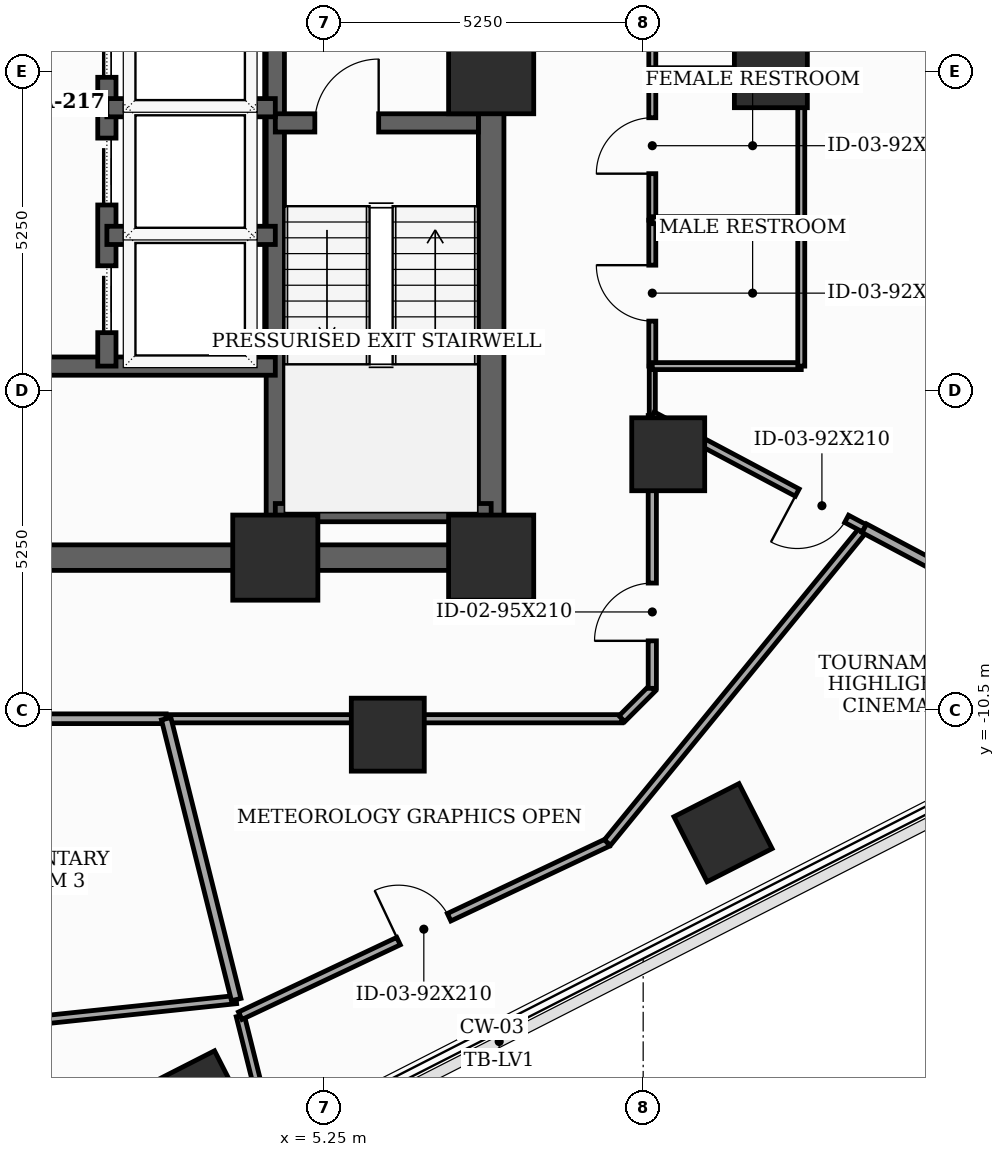
"""IFC4 building model, lengths in metres.
Left out: names, types, materials, properties, quantities, classifications, styles, units other than length and angle.
Written with IfcOpenShell. Run it as: python <this file> out.ifc"""

import sys

from ifc_helpers import new_model, si_unit, direction, frame, frame_2d, origin, origin_2d, place, context, subcontext, project, spatial, rectangle, extrude, element, fill, save


model = new_model("IFC4")
c1 = context("Model", 3, precision=1e-05, world=origin(), true_north=direction((0.0, 1.0)))
c2 = subcontext(c1, "Body", "Model", "MODEL_VIEW")
j1 = project(units=[si_unit("LENGTHUNIT", "METRE"), si_unit("PLANEANGLEUNIT", "RADIAN")], contexts=[c1])
p1 = place(None, origin())
s1 = spatial("IfcSite", under=j1, at=p1, CompositionType="ELEMENT")
p2 = place(p1, origin())
s2 = spatial("IfcBuilding", under=s1, at=p2, CompositionType="ELEMENT")
p3 = place(p2, frame((0.0, 0.0, 123.6)))
s3 = spatial("IfcBuildingStorey", under=s2, at=p3, CompositionType="ELEMENT", Elevation=123.6)
for number, where, z_axis, x_axis in (
    (1, (4.45, -8.0, 0.0), (0.0, 0.0, 1.0), (1.0, 0.0, 0.0)),
    (2, (8.0, -8.0, 0.0), (0.0, 0.0, 1.0), (1.0, 0.0, 0.0)),
    (3, (8.0, 0.0, 0.0), (0.0, 0.0, 1.0), (1.0, 0.0, 0.0)),
):
    element("IfcColumn", number, at=place(p3, frame(where, z_axis=z_axis, x_axis=x_axis)), inside=s3, PredefinedType="COLUMN", context=c2, shape_type="SweptSolid", body=[
        extrude(rectangle(XDim=1.4, YDim=1.4, at=origin_2d()), origin(), (0.0, 0.0, 1.0), 3.7),
    ])
for number, where, z_axis, x_axis in (
    (4, (12.6, 0.0, 0.0), (0.0, 0.0, 1.0), (1.0, 0.0, 0.0)),
    (5, (6.3, -10.912, 0.0), (0.0, 0.0, 1.0), (1.0, 0.0, 0.0)),
    (6, (10.912, -6.3, 0.0), (0.0, 0.0, 1.0), (1.0, 0.0, 0.0)),
    (7, (3.188, -16.918, 0.0), (0.0, 0.0, 1.0), (0.891, 0.454, 0.0)),
    (8, (11.813, -12.524, 0.0), (0.0, 0.0, 1.0), (0.891, 0.454, 0.0)),
):
    element("IfcColumn", number, at=place(p3, frame(where, z_axis=z_axis, x_axis=x_axis)), inside=s3, PredefinedType="COLUMN", context=c2, shape_type="SweptSolid", body=[
        extrude(rectangle(XDim=1.2, YDim=1.2, at=origin_2d()), origin(), (0.0, 0.0, 1.0), 3.7),
    ])
p4 = place(p3, frame((8.0, -8.0, 0.0), z_axis=(0.0, 0.0, 1.0), x_axis=(0.0, 1.0, 0.0)))
e9 = element("IfcWall", 9, at=p4, inside=s3, PredefinedType="SHEAR", context=c2, shape_type="SweptSolid", body=[
    extrude(rectangle(XDim=16.0, YDim=0.42, at=frame_2d((8.0, 0.0))), origin(), (0.0, 0.0, 1.0), 3.5),
])
p5 = place(p4, frame((9.6, 0.0, 0.0)))
e10 = element("IfcOpeningElement", 10, at=p5, cuts=e9, PredefinedType="OPENING", context=c2, shape_type="SweptSolid", body=[
    extrude(rectangle(XDim=1.05, YDim=2.15, at=frame_2d((0.525, 1.075))), frame((0.0, 0.22, 0.0), z_axis=(0.0, -1.0, 0.0), x_axis=(1.0, 0.0, 0.0)), (0.0, 0.0, 1.0), 0.44),
])
p6 = place(p4, frame((14.229, 0.0, 0.0)))
e11 = element("IfcOpeningElement", 11, at=p6, cuts=e9, PredefinedType="OPENING", context=c2, shape_type="SweptSolid", body=[
    extrude(rectangle(XDim=0.85, YDim=2.02, at=frame_2d((0.425, 1.01))), frame((0.0, 0.22, 0.0), z_axis=(0.0, -1.0, 0.0), x_axis=(1.0, 0.0, 0.0)), (0.0, 0.0, 1.0), 0.44),
])
p7 = place(p3, frame((-8.0, -8.0, 0.0), z_axis=(0.0, 0.0, 1.0), x_axis=(1.0, 0.0, 0.0)))
e12 = element("IfcWall", 12, at=p7, inside=s3, PredefinedType="SHEAR", context=c2, shape_type="SweptSolid", body=[
    extrude(rectangle(XDim=16.0, YDim=0.42, at=frame_2d((8.0, 0.0))), origin(), (0.0, 0.0, 1.0), 3.5),
])
p8 = place(p7, frame((7.52, 0.0, 0.0)))
e13 = element("IfcOpeningElement", 13, at=p8, cuts=e12, PredefinedType="OPENING", context=c2, shape_type="SweptSolid", body=[
    extrude(rectangle(XDim=0.95, YDim=2.1, at=frame_2d((0.475, 1.05))), frame((0.0, 0.22, 0.0), z_axis=(0.0, -1.0, 0.0), x_axis=(1.0, 0.0, 0.0)), (0.0, 0.0, 1.0), 0.44),
])
p9 = place(p3, frame((4.45, -7.79, 0.0), z_axis=(0.0, 0.0, 1.0), x_axis=(0.0, 1.0, 0.0)))
e14 = element("IfcWall", 14, at=p9, inside=s3, PredefinedType="SHEAR", context=c2, shape_type="SweptSolid", body=[
    extrude(rectangle(XDim=15.58, YDim=0.3, at=frame_2d((7.79, 0.0))), origin(), (0.0, 0.0, 1.0), 3.5),
])
p10 = place(p3, frame((4.45, -0.85, 0.0), z_axis=(0.0, 0.0, 1.0), x_axis=(1.0, 0.0, 0.0)))
e15 = element("IfcWall", 15, at=p10, inside=s3, PredefinedType="SHEAR", context=c2, shape_type="SweptSolid", body=[
    extrude(rectangle(XDim=3.34, YDim=0.3, at=frame_2d((1.67, 0.0))), origin(), (0.0, 0.0, 1.0), 3.5),
])
p11 = place(p10, frame((0.65, 0.0, 0.0)))
e16 = element("IfcOpeningElement", 16, at=p11, cuts=e15, PredefinedType="OPENING", context=c2, shape_type="SweptSolid", body=[
    extrude(rectangle(XDim=1.05, YDim=2.15, at=frame_2d((0.525, 1.075))), frame((0.0, 0.16, 0.0), z_axis=(0.0, -1.0, 0.0), x_axis=(1.0, 0.0, 0.0)), (0.0, 0.0, 1.0), 0.32),
])
p12 = place(p3, frame((4.45, -7.26, 0.0), z_axis=(0.0, 0.0, 1.0), x_axis=(1.0, 0.0, 0.0)))
e17 = element("IfcWall", 17, at=p12, inside=s3, PredefinedType="SHEAR", context=c2, shape_type="SweptSolid", body=[
    extrude(rectangle(XDim=3.55, YDim=0.3, at=frame_2d((1.775, 0.0))), origin(), (0.0, 0.0, 1.0), 3.5),
])
p13 = place(p3, frame((-4.45, -4.85, 0.0), z_axis=(0.0, 0.0, 1.0), x_axis=(1.0, 0.0, 0.0)))
e18 = element("IfcWall", 18, at=p13, inside=s3, PredefinedType="SHEAR", context=c2, shape_type="SweptSolid", body=[
    extrude(rectangle(XDim=8.9, YDim=0.3, at=frame_2d((4.45, 0.0))), origin(), (0.0, 0.0, 1.0), 3.5),
])
p14 = place(p3, frame((1.68, -4.85, 0.0), z_axis=(0.0, 0.0, 1.0), x_axis=(0.0, 1.0, 0.0)))
e19 = element("IfcWall", 19, at=p14, inside=s3, PredefinedType="SHEAR", context=c2, shape_type="SweptSolid", body=[
    extrude(rectangle(XDim=12.64, YDim=0.3, at=frame_2d((6.32, 0.0))), origin(), (0.0, 0.0, 1.0), 3.5),
])
p15 = place(p14, frame((0.55, 0.0, 0.0)))
e20 = element("IfcOpeningElement", 20, at=p15, cuts=e19, PredefinedType="OPENING", context=c2, shape_type="SweptSolid", body=[
    extrude(rectangle(XDim=1.1, YDim=2.1, at=frame_2d((0.55, 1.05))), frame((0.0, 0.16, 0.0), z_axis=(0.0, -1.0, 0.0), x_axis=(1.0, 0.0, 0.0)), (0.0, 0.0, 1.0), 0.32),
])
p16 = place(p14, frame((2.65, 0.0, 0.0)))
e21 = element("IfcOpeningElement", 21, at=p16, cuts=e19, PredefinedType="OPENING", context=c2, shape_type="SweptSolid", body=[
    extrude(rectangle(XDim=1.1, YDim=2.1, at=frame_2d((0.55, 1.05))), frame((0.0, 0.16, 0.0), z_axis=(0.0, -1.0, 0.0), x_axis=(1.0, 0.0, 0.0)), (0.0, 0.0, 1.0), 0.32),
])
p17 = place(p14, frame((4.75, 0.0, 0.0)))
e22 = element("IfcOpeningElement", 22, at=p17, cuts=e19, PredefinedType="OPENING", context=c2, shape_type="SweptSolid", body=[
    extrude(rectangle(XDim=1.1, YDim=2.1, at=frame_2d((0.55, 1.05))), frame((0.0, 0.16, 0.0), z_axis=(0.0, -1.0, 0.0), x_axis=(1.0, 0.0, 0.0)), (0.0, 0.0, 1.0), 0.32),
])
p18 = place(p14, frame((6.85, 0.0, 0.0)))
e23 = element("IfcOpeningElement", 23, at=p18, cuts=e19, PredefinedType="OPENING", context=c2, shape_type="SweptSolid", body=[
    extrude(rectangle(XDim=1.1, YDim=2.1, at=frame_2d((0.55, 1.05))), frame((0.0, 0.16, 0.0), z_axis=(0.0, -1.0, 0.0), x_axis=(1.0, 0.0, 0.0)), (0.0, 0.0, 1.0), 0.32),
])
p19 = place(p14, frame((8.95, 0.0, 0.0)))
e24 = element("IfcOpeningElement", 24, at=p19, cuts=e19, PredefinedType="OPENING", context=c2, shape_type="SweptSolid", body=[
    extrude(rectangle(XDim=1.1, YDim=2.1, at=frame_2d((0.55, 1.05))), frame((0.0, 0.16, 0.0), z_axis=(0.0, -1.0, 0.0), x_axis=(1.0, 0.0, 0.0)), (0.0, 0.0, 1.0), 0.32),
])
p20 = place(p14, frame((11.05, 0.0, 0.0)))
e25 = element("IfcOpeningElement", 25, at=p20, cuts=e19, PredefinedType="OPENING", context=c2, shape_type="SweptSolid", body=[
    extrude(rectangle(XDim=1.1, YDim=2.1, at=frame_2d((0.55, 1.05))), frame((0.0, 0.16, 0.0), z_axis=(0.0, -1.0, 0.0), x_axis=(1.0, 0.0, 0.0)), (0.0, 0.0, 1.0), 0.32),
])
for number, where, z_axis, x_axis in (
    (26, (1.68, -2.7, 0.0), (0.0, 0.0, 1.0), (1.0, 0.0, 0.0)),
    (27, (1.68, -0.6, 0.0), (0.0, 0.0, 1.0), (1.0, 0.0, 0.0)),
):
    element("IfcWall", number, at=place(p3, frame(where, z_axis=z_axis, x_axis=x_axis)), inside=s3, PredefinedType="SHEAR", context=c2, shape_type="SweptSolid", body=[
        extrude(rectangle(XDim=2.77, YDim=0.3, at=frame_2d((1.385, 0.0))), origin(), (0.0, 0.0, 1.0), 3.5),
    ])
p21 = place(p3, frame((-8.936, -10.65, 0.0), z_axis=(0.0, 0.0, 1.0), x_axis=(1.0, 0.0, 0.0)))
e28 = element("IfcWall", 28, at=p21, inside=s3, PredefinedType="PARTITIONING", context=c2, shape_type="SweptSolid", body=[
    extrude(rectangle(XDim=11.591, YDim=0.16, at=frame_2d((5.795, 0.0))), origin(), (0.0, 0.0, 1.0), 2.785),
])
p22 = place(p21, frame((5.295, 0.0, 0.0)))
e29 = element("IfcOpeningElement", 29, at=p22, cuts=e28, PredefinedType="OPENING", context=c2, shape_type="SweptSolid", body=[
    extrude(rectangle(XDim=1.0, YDim=2.15, at=frame_2d((0.5, 1.075))), frame((0.0, 0.09, 0.0), z_axis=(0.0, -1.0, 0.0), x_axis=(1.0, 0.0, 0.0)), (0.0, 0.0, 1.0), 0.18),
])
p23 = place(p3, frame((2.655, -10.65, 0.0), z_axis=(0.0, 0.0, 1.0), x_axis=(1.0, 0.0, 0.0)))
e30 = element("IfcWall", 30, at=p23, inside=s3, PredefinedType="PARTITIONING", context=c2, shape_type="SweptSolid", body=[
    extrude(rectangle(XDim=7.495, YDim=0.135, at=frame_2d((3.748, 0.0))), origin(), (0.0, 0.0, 1.0), 2.785),
])
p24 = place(p3, frame((10.15, -10.65, 0.0), z_axis=(0.0, 0.0, 1.0), x_axis=(0.707106781187, 0.707106781187, 0.0)))
e31 = element("IfcWall", 31, at=p24, inside=s3, PredefinedType="PARTITIONING", context=c2, shape_type="SweptSolid", body=[
    extrude(rectangle(XDim=0.707, YDim=0.135, at=frame_2d((0.354, 0.0))), origin(), (0.0, 0.0, 1.0), 3.5),
])
p25 = place(p3, frame((10.65, -10.15, 0.0), z_axis=(0.0, 0.0, 1.0), x_axis=(0.0, 1.0, 0.0)))
e32 = element("IfcWall", 32, at=p25, inside=s3, PredefinedType="PARTITIONING", context=c2, shape_type="SweptSolid", body=[
    extrude(rectangle(XDim=4.487, YDim=0.135, at=frame_2d((2.243, 0.0))), origin(), (0.0, 0.0, 1.0), 2.785),
])
p26 = place(p25, frame((0.781, 0.0, 0.0)))
e33 = element("IfcOpeningElement", 33, at=p26, cuts=e32, PredefinedType="OPENING", context=c2, shape_type="SweptSolid", body=[
    extrude(rectangle(XDim=0.95, YDim=2.1, at=frame_2d((0.475, 1.05))), frame((0.0, 0.077, 0.0), z_axis=(0.0, -1.0, 0.0), x_axis=(1.0, 0.0, 0.0)), (0.0, 0.0, 1.0), 0.155),
])
p27 = place(p3, frame((10.65, -4.85, 0.0), z_axis=(0.0, 0.0, 1.0), x_axis=(0.0, 1.0, 0.0)))
e34 = element("IfcWall", 34, at=p27, inside=s3, PredefinedType="PARTITIONING", context=c2, shape_type="SweptSolid", body=[
    extrude(rectangle(XDim=2.4, YDim=0.115, at=frame_2d((1.2, 0.0))), origin(), (0.0, 0.0, 1.0), 3.5),
])
p28 = place(p27, frame((0.74, 0.0, 0.0)))
e35 = element("IfcOpeningElement", 35, at=p28, cuts=e34, PredefinedType="OPENING", context=c2, shape_type="SweptSolid", body=[
    extrude(rectangle(XDim=0.92, YDim=2.1, at=frame_2d((0.46, 1.05))), frame((0.0, 0.067, 0.0), z_axis=(0.0, -1.0, 0.0), x_axis=(1.0, 0.0, 0.0)), (0.0, 0.0, 1.0), 0.135),
])
p29 = place(p3, frame((10.65, -2.45, 0.0), z_axis=(0.0, 0.0, 1.0), x_axis=(0.0, 1.0, 0.0)))
e36 = element("IfcWall", 36, at=p29, inside=s3, PredefinedType="PARTITIONING", context=c2, shape_type="SweptSolid", body=[
    extrude(rectangle(XDim=2.45, YDim=0.115, at=frame_2d((1.225, 0.0))), origin(), (0.0, 0.0, 1.0), 2.785),
])
p30 = place(p29, frame((0.765, 0.0, 0.0)))
e37 = element("IfcOpeningElement", 37, at=p30, cuts=e36, PredefinedType="OPENING", context=c2, shape_type="SweptSolid", body=[
    extrude(rectangle(XDim=0.92, YDim=2.1, at=frame_2d((0.46, 1.05))), frame((0.0, 0.067, 0.0), z_axis=(0.0, -1.0, 0.0), x_axis=(1.0, 0.0, 0.0)), (0.0, 0.0, 1.0), 0.135),
])
p31 = place(p3, frame((10.65, -5.663, 0.0), z_axis=(0.0, 0.0, 1.0), x_axis=(0.0, 1.0, 0.0)))
e38 = element("IfcWall", 38, at=p31, inside=s3, PredefinedType="MOVABLE", context=c2, shape_type="SweptSolid", body=[
    extrude(rectangle(XDim=0.813, YDim=0.1, at=frame_2d((0.406, 0.0))), origin(), (0.0, 0.0, 1.0), 3.5),
])
p32 = place(p3, frame((10.65, 0.0, 0.0), z_axis=(0.0, 0.0, 1.0), x_axis=(0.0, 1.0, 0.0)))
e39 = element("IfcWall", 39, at=p32, inside=s3, PredefinedType="PARTITIONING", context=c2, shape_type="SweptSolid", body=[
    extrude(rectangle(XDim=2.45, YDim=0.115, at=frame_2d((1.225, 0.0))), origin(), (0.0, 0.0, 1.0), 2.785),
])
p33 = place(p32, frame((0.765, 0.0, 0.0)))
e40 = element("IfcOpeningElement", 40, at=p33, cuts=e39, PredefinedType="OPENING", context=c2, shape_type="SweptSolid", body=[
    extrude(rectangle(XDim=0.92, YDim=2.1, at=frame_2d((0.46, 1.05))), frame((0.0, 0.067, 0.0), z_axis=(0.0, -1.0, 0.0), x_axis=(1.0, 0.0, 0.0)), (0.0, 0.0, 1.0), 0.135),
])
p34 = place(p3, frame((3.807, -15.269, 0.0), z_axis=(0.0, 0.0, 1.0), x_axis=(-0.994513256503, -0.104610623932, 0.0)))
e41 = element("IfcWall", 41, at=p34, inside=s3, PredefinedType="PARTITIONING", context=c2, shape_type="SweptSolid", body=[
    extrude(rectangle(XDim=4.798, YDim=0.135, at=frame_2d((2.399, 0.0))), origin(), (0.0, 0.0, 1.0), 2.885),
])
p35 = place(p3, frame((4.393, -17.618, 0.0), z_axis=(0.0, 0.0, 1.0), x_axis=(-0.242107483306, 0.970249435211, 0.0)))
e42 = element("IfcWall", 42, at=p35, inside=s3, PredefinedType="PARTITIONING", context=c2, shape_type="SweptSolid", body=[
    extrude(rectangle(XDim=2.147, YDim=0.135, at=frame_2d((1.073, 0.0))), origin(), (0.0, 0.0, 1.0), 2.985),
])
p36 = place(p3, frame((3.807, -15.269, 0.0), z_axis=(0.0, 0.0, 1.0), x_axis=(-0.241956377954, 0.970287128209, 0.0)))
e43 = element("IfcWall", 43, at=p36, inside=s3, PredefinedType="PARTITIONING", context=c2, shape_type="SweptSolid", body=[
    extrude(rectangle(XDim=4.76, YDim=0.16, at=frame_2d((2.38, 0.0))), origin(), (0.0, 0.0, 1.0), 2.785),
])
p37 = place(p3, frame((3.873, -15.535, 0.0), z_axis=(0.0, 0.0, 1.0), x_axis=(0.904472849066, 0.426531200855, 0.0)))
e44 = element("IfcWall", 44, at=p37, inside=s3, PredefinedType="PARTITIONING", context=c2, shape_type="SweptSolid", body=[
    extrude(rectangle(XDim=6.677, YDim=0.135, at=frame_2d((3.338, 0.0))), origin(), (0.0, 0.0, 1.0), 3.5),
])
p38 = place(p37, frame((2.878, 0.0, 0.0)))
e45 = element("IfcOpeningElement", 45, at=p38, cuts=e44, PredefinedType="OPENING", context=c2, shape_type="SweptSolid", body=[
    extrude(rectangle(XDim=0.92, YDim=2.1, at=frame_2d((0.46, 1.05))), frame((0.0, 0.077, 0.0), z_axis=(0.0, -1.0, 0.0), x_axis=(1.0, 0.0, 0.0)), (0.0, 0.0, 1.0), 0.155),
])
p39 = place(p3, frame((9.912, -12.687, 0.0), z_axis=(0.0, 0.0, 1.0), x_axis=(0.632781686385, 0.774330250846, 0.0)))
e46 = element("IfcWall", 46, at=p39, inside=s3, PredefinedType="PARTITIONING", context=c2, shape_type="SweptSolid", body=[
    extrude(rectangle(XDim=6.677, YDim=0.135, at=frame_2d((3.338, 0.0))), origin(), (0.0, 0.0, 1.0), 2.885),
])
p40 = place(p3, frame((14.137, -7.517, 0.0), z_axis=(0.0, 0.0, 1.0), x_axis=(-0.882957991608, 0.46945200506, 0.0)))
e47 = element("IfcWall", 47, at=p40, inside=s3, PredefinedType="PARTITIONING", context=c2, shape_type="SweptSolid", body=[
    extrude(rectangle(XDim=3.949, YDim=0.135, at=frame_2d((1.975, 0.0))), origin(), (0.0, 0.0, 1.0), 2.785),
])
p41 = place(p40, frame((0.33, 0.0, 0.0)))
e48 = element("IfcOpeningElement", 48, at=p41, cuts=e47, PredefinedType="OPENING", context=c2, shape_type="SweptSolid", body=[
    extrude(rectangle(XDim=0.92, YDim=2.1, at=frame_2d((0.46, 1.05))), frame((0.0, 0.077, 0.0), z_axis=(0.0, -1.0, 0.0), x_axis=(1.0, 0.0, 0.0)), (0.0, 0.0, 1.0), 0.155),
])
p42 = place(p3, frame((19.07, -10.14, 0.0), z_axis=(0.0, 0.0, 1.0), x_axis=(-0.882959500857, 0.469449166413, 0.0)))
e49 = element("IfcWall", 49, at=p42, inside=s3, PredefinedType="PARTITIONING", context=c2, shape_type="SweptSolid", body=[
    extrude(rectangle(XDim=5.586, YDim=0.16, at=frame_2d((2.793, 0.0))), origin(), (0.0, 0.0, 1.0), 2.985),
])
for number, where, z_axis, x_axis in (
    (50, (13.1, -2.45, 0.0), (0.0, 0.0, 1.0), (-1.0, 0.0, 0.0)),
    (51, (10.65, -4.85, 0.0), (0.0, 0.0, 1.0), (1.0, 0.0, 0.0)),
):
    element("IfcWall", number, at=place(p3, frame(where, z_axis=z_axis, x_axis=x_axis)), inside=s3, PredefinedType="PARTITIONING", context=c2, shape_type="SweptSolid", body=[
        extrude(rectangle(XDim=2.45, YDim=0.115, at=frame_2d((1.225, 0.0))), origin(), (0.0, 0.0, 1.0), 2.785),
    ])
p43 = place(p3, frame((13.1, -4.85, 0.0), z_axis=(0.0, 0.0, 1.0), x_axis=(0.0, 1.0, 0.0)))
e52 = element("IfcWall", 52, at=p43, inside=s3, PredefinedType="PARTITIONING", context=c2, shape_type="SweptSolid", body=[
    extrude(rectangle(XDim=2.4, YDim=0.115, at=frame_2d((1.2, 0.0))), origin(), (0.0, 0.0, 1.0), 3.5),
])
p44 = place(p3, frame((13.1, -2.45, 0.0), z_axis=(0.0, 0.0, 1.0), x_axis=(0.0, 1.0, 0.0)))
e53 = element("IfcWall", 53, at=p44, inside=s3, PredefinedType="PARTITIONING", context=c2, shape_type="SweptSolid", body=[
    extrude(rectangle(XDim=2.45, YDim=0.115, at=frame_2d((1.225, 0.0))), origin(), (0.0, 0.0, 1.0), 3.5),
])
p45 = place(p3, frame((13.1, 0.0, 0.0), z_axis=(0.0, 0.0, 1.0), x_axis=(-1.0, 0.0, 0.0)))
e54 = element("IfcWall", 54, at=p45, inside=s3, PredefinedType="PARTITIONING", context=c2, shape_type="SweptSolid", body=[
    extrude(rectangle(XDim=2.45, YDim=0.115, at=frame_2d((1.225, 0.0))), origin(), (0.0, 0.0, 1.0), 2.785),
])
p46 = place(p3, frame((13.1, 2.45, 0.0), z_axis=(0.0, 0.0, 1.0), x_axis=(0.0, -1.0, 0.0)))
e55 = element("IfcWall", 55, at=p46, inside=s3, PredefinedType="MOVABLE", context=c2, shape_type="SweptSolid", body=[
    extrude(rectangle(XDim=2.45, YDim=0.1, at=frame_2d((1.225, 0.0))), origin(), (0.0, 0.0, 1.0), 3.5),
])
p47 = place(p11, origin())
e56 = element("IfcDoor", 56, at=p47, inside=s3, OperationType="SINGLE_SWING_RIGHT", PredefinedType="DOOR", context=c2, shape_type="SweptSolid", body=[
    extrude(rectangle(XDim=1.05, YDim=2.15, at=frame_2d((0.525, 1.075))), frame((0.0, 0.025, 0.0), z_axis=(0.0, -1.0, 0.0), x_axis=(1.0, 0.0, 0.0)), (0.0, 0.0, 1.0), 0.05),
])
fill(e16, e56)
p48 = place(p15, origin())
e57 = element("IfcDoor", 57, at=p48, inside=s3, OperationType="SLIDING_TO_LEFT", PredefinedType="DOOR", context=c2, shape_type="SweptSolid", body=[
    extrude(rectangle(XDim=1.1, YDim=2.1, at=frame_2d((0.55, 1.05))), frame((0.0, 0.025, 0.0), z_axis=(0.0, -1.0, 0.0), x_axis=(1.0, 0.0, 0.0)), (0.0, 0.0, 1.0), 0.05),
])
fill(e20, e57)
p49 = place(p16, origin())
e58 = element("IfcDoor", 58, at=p49, inside=s3, OperationType="SLIDING_TO_LEFT", PredefinedType="DOOR", context=c2, shape_type="SweptSolid", body=[
    extrude(rectangle(XDim=1.1, YDim=2.1, at=frame_2d((0.55, 1.05))), frame((0.0, 0.025, 0.0), z_axis=(0.0, -1.0, 0.0), x_axis=(1.0, 0.0, 0.0)), (0.0, 0.0, 1.0), 0.05),
])
fill(e21, e58)
p50 = place(p17, origin())
e59 = element("IfcDoor", 59, at=p50, inside=s3, OperationType="SLIDING_TO_LEFT", PredefinedType="DOOR", context=c2, shape_type="SweptSolid", body=[
    extrude(rectangle(XDim=1.1, YDim=2.1, at=frame_2d((0.55, 1.05))), frame((0.0, 0.025, 0.0), z_axis=(0.0, -1.0, 0.0), x_axis=(1.0, 0.0, 0.0)), (0.0, 0.0, 1.0), 0.05),
])
fill(e22, e59)
p51 = place(p26, origin())
e60 = element("IfcDoor", 60, at=p51, inside=s3, OperationType="SINGLE_SWING_LEFT", PredefinedType="DOOR", context=c2, shape_type="SweptSolid", body=[
    extrude(rectangle(XDim=0.95, YDim=2.1, at=frame_2d((0.475, 1.05))), frame((0.0, 0.025, 0.0), z_axis=(0.0, -1.0, 0.0), x_axis=(1.0, 0.0, 0.0)), (0.0, 0.0, 1.0), 0.05),
])
fill(e33, e60)
p52 = place(p28, origin())
e61 = element("IfcDoor", 61, at=p52, inside=s3, OperationType="SINGLE_SWING_RIGHT", PredefinedType="DOOR", context=c2, shape_type="SweptSolid", body=[
    extrude(rectangle(XDim=0.92, YDim=2.1, at=frame_2d((0.46, 1.05))), frame((0.0, 0.025, 0.0), z_axis=(0.0, -1.0, 0.0), x_axis=(1.0, 0.0, 0.0)), (0.0, 0.0, 1.0), 0.05),
])
fill(e35, e61)
p53 = place(p30, origin())
e62 = element("IfcDoor", 62, at=p53, inside=s3, OperationType="SINGLE_SWING_LEFT", PredefinedType="DOOR", context=c2, shape_type="SweptSolid", body=[
    extrude(rectangle(XDim=0.92, YDim=2.1, at=frame_2d((0.46, 1.05))), frame((0.0, 0.025, 0.0), z_axis=(0.0, -1.0, 0.0), x_axis=(1.0, 0.0, 0.0)), (0.0, 0.0, 1.0), 0.05),
])
fill(e37, e62)
p54 = place(p38, origin())
e63 = element("IfcDoor", 63, at=p54, inside=s3, OperationType="SINGLE_SWING_LEFT", PredefinedType="DOOR", context=c2, shape_type="SweptSolid", body=[
    extrude(rectangle(XDim=0.92, YDim=2.1, at=frame_2d((0.46, 1.05))), frame((0.0, 0.025, 0.0), z_axis=(0.0, -1.0, 0.0), x_axis=(1.0, 0.0, 0.0)), (0.0, 0.0, 1.0), 0.05),
])
fill(e45, e63)
p55 = place(p41, origin())
e64 = element("IfcDoor", 64, at=p55, inside=s3, OperationType="SINGLE_SWING_RIGHT", PredefinedType="DOOR", context=c2, shape_type="SweptSolid", body=[
    extrude(rectangle(XDim=0.92, YDim=2.1, at=frame_2d((0.46, 1.05))), frame((0.0, 0.025, 0.0), z_axis=(0.0, -1.0, 0.0), x_axis=(1.0, 0.0, 0.0)), (0.0, 0.0, 1.0), 0.05),
])
fill(e48, e64)
save(model, sys.argv[1])
